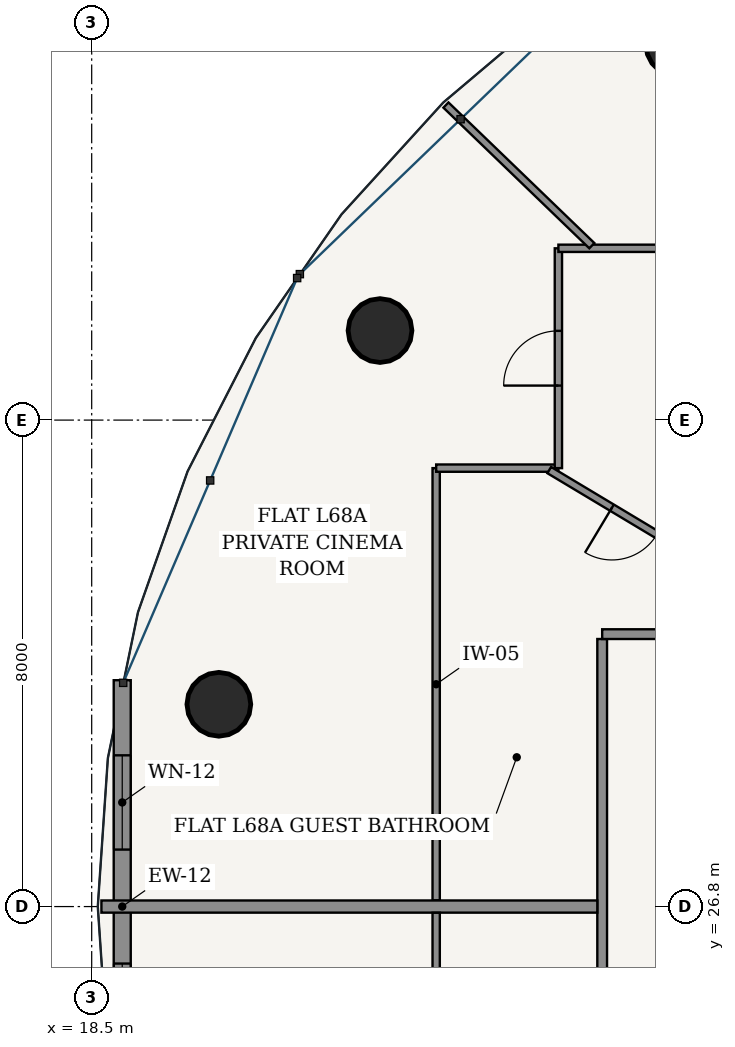
"""IFC4 building model, lengths in metres.
Left out: names, types, materials, properties, quantities, classifications, styles, units other than length and angle.
Written with IfcOpenShell. Run it as: python <this file> out.ifc"""

import sys

from ifc_helpers import new_model, si_unit, direction, frame, frame_2d, origin, origin_2d, place, context, subcontext, project, spatial, rectangle, hollow_circle, extrude, source, transform, mapped, element, fill, save


model = new_model("IFC4")
c1 = context("Model", 3, precision=1e-05, world=origin(), true_north=direction((-0.2419218956, 0.970295726276)))
c2 = subcontext(c1, "Body", "Model", "MODEL_VIEW")
j1 = project(units=[si_unit("LENGTHUNIT", "METRE"), si_unit("PLANEANGLEUNIT", "RADIAN")], contexts=[c1])
p1 = place(None, origin())
s1 = spatial("IfcSite", under=j1, at=p1, CompositionType="ELEMENT")
p2 = place(p1, origin())
s2 = spatial("IfcBuilding", under=s1, at=p2, CompositionType="ELEMENT")
p3 = place(p2, frame((0.0, 0.0, 259.45)))
s3 = spatial("IfcBuildingStorey", under=s2, at=p3, CompositionType="ELEMENT", Elevation=259.45)
for number, where, z_axis, x_axis in (
    (1, (28.139, 40.977, 0.0), (0.0, 0.0, 1.0), (1.0, 0.0, 0.0)),
    (2, (23.241, 36.272, 0.0), (0.0, 0.0, 1.0), (1.0, 0.0, 0.0)),
    (3, (20.591, 30.126, 0.0), (0.0, 0.0, 1.0), (1.0, 0.0, 0.0)),
):
    element("IfcColumn", number, at=place(p3, frame(where, z_axis=z_axis, x_axis=x_axis)), inside=s3, PredefinedType="COLUMN", context=c2, shape_type="SweptSolid", body=[
        extrude(hollow_circle(Radius=0.525, WallThickness=0.035, at=origin_2d()), origin(), (0.0, 0.0, 1.0), 3.75),
    ])
p4 = place(p3, frame((19.002, 30.522, 0.0), z_axis=(0.0, 0.0, 1.0), x_axis=(0.0, -1.0, 0.0)))
e4 = element("IfcWall", 4, at=p4, inside=s3, PredefinedType="SOLIDWALL", context=c2, shape_type="SweptSolid", body=[
    extrude(rectangle(XDim=7.445, YDim=0.28, at=frame_2d((3.722, 0.0))), origin(), (0.0, 0.0, 1.0), 3.49),
])
p5 = place(p4, frame((1.235, 0.0, 0.85)))
e5 = element("IfcOpeningElement", 5, at=p5, cuts=e4, PredefinedType="OPENING", context=c2, shape_type="SweptSolid", body=[
    extrude(rectangle(XDim=1.55, YDim=1.95, at=frame_2d((0.775, 0.975))), frame((0.0, 0.15, 0.0), z_axis=(0.0, -1.0, 0.0), x_axis=(1.0, 0.0, 0.0)), (0.0, 0.0, 1.0), 0.3),
])
p6 = place(p4, frame((4.66, 0.0, 0.85)))
e6 = element("IfcOpeningElement", 6, at=p6, cuts=e4, PredefinedType="OPENING", context=c2, shape_type="SweptSolid", body=[
    extrude(rectangle(XDim=1.55, YDim=1.95, at=frame_2d((0.775, 0.975))), frame((0.0, 0.15, 0.0), z_axis=(0.0, -1.0, 0.0), x_axis=(1.0, 0.0, 0.0)), (0.0, 0.0, 1.0), 0.3),
])
p7 = place(p3, frame((26.895, 17.275, 0.0), z_axis=(0.0, 0.0, 1.0), x_axis=(0.0, 1.0, 0.0)))
e7 = element("IfcWall", 7, at=p7, inside=s3, PredefinedType="PARTITIONING", context=c2, shape_type="SweptSolid", body=[
    extrude(rectangle(XDim=13.925, YDim=0.16, at=frame_2d((6.962, 0.0))), origin(), (0.0, 0.0, 1.0), 3.015),
])
p8 = place(p7, frame((1.992, 0.0, 0.0)))
e8 = element("IfcOpeningElement", 8, at=p8, cuts=e7, PredefinedType="OPENING", context=c2, shape_type="SweptSolid", body=[
    extrude(rectangle(XDim=0.98, YDim=2.2, at=frame_2d((0.49, 1.1))), frame((0.0, 0.09, 0.0), z_axis=(0.0, -1.0, 0.0), x_axis=(1.0, 0.0, 0.0)), (0.0, 0.0, 1.0), 0.18),
])
p9 = place(p3, frame((26.895, 31.28, 0.0), z_axis=(0.0, 0.0, 1.0), x_axis=(1.0, 0.0, 0.0)))
e9 = element("IfcWall", 9, at=p9, inside=s3, PredefinedType="PARTITIONING", context=c2, shape_type="SweptSolid", body=[
    extrude(rectangle(XDim=1.93, YDim=0.16, at=frame_2d((0.965, 0.0))), origin(), (0.0, 0.0, 1.0), 3.49),
])
p10 = place(p3, frame((24.165, 26.902, 0.0), z_axis=(0.0, 0.0, 1.0), x_axis=(0.0, 1.0, 0.0)))
e10 = element("IfcWall", 10, at=p10, inside=s3, PredefinedType="PARTITIONING", context=c2, shape_type="SweptSolid", body=[
    extrude(rectangle(XDim=7.108, YDim=0.12, at=frame_2d((3.554, 0.0))), origin(), (0.0, 0.0, 1.0), 3.015),
])
p11 = place(p3, frame((24.165, 34.01, 0.0), z_axis=(0.0, 0.0, 1.0), x_axis=(1.0, 0.0, 0.0)))
e11 = element("IfcWall", 11, at=p11, inside=s3, PredefinedType="PARTITIONING", context=c2, shape_type="SweptSolid", body=[
    extrude(rectangle(XDim=2.01, YDim=0.12, at=frame_2d((1.005, 0.0))), origin(), (0.0, 0.0, 1.0), 3.209),
])
p12 = place(p3, frame((26.175, 34.01, 0.0), z_axis=(0.0, 0.0, 1.0), x_axis=(0.0, 1.0, 0.0)))
e12 = element("IfcWall", 12, at=p12, inside=s3, PredefinedType="PARTITIONING", context=c2, shape_type="SweptSolid", body=[
    extrude(rectangle(XDim=3.615, YDim=0.12, at=frame_2d((1.808, 0.0))), origin(), (0.0, 0.0, 1.0), 3.015),
])
p13 = place(p12, frame((1.357, 0.0, 0.0)))
e13 = element("IfcOpeningElement", 13, at=p13, cuts=e12, PredefinedType="OPENING", context=c2, shape_type="SweptSolid", body=[
    extrude(rectangle(XDim=0.9, YDim=2.15, at=frame_2d((0.45, 1.075))), frame((0.0, 0.07, 0.0), z_axis=(0.0, -1.0, 0.0), x_axis=(1.0, 0.0, 0.0)), (0.0, 0.0, 1.0), 0.14),
])
p14 = place(p3, frame((26.175, 37.625, 0.0), z_axis=(0.0, 0.0, 1.0), x_axis=(1.0, 0.0, 0.0)))
e14 = element("IfcWall", 14, at=p14, inside=s3, PredefinedType="PARTITIONING", context=c2, shape_type="SweptSolid", body=[
    extrude(rectangle(XDim=23.65, YDim=0.12, at=frame_2d((11.825, 0.0))), origin(), (0.0, 0.0, 1.0), 3.015),
])
p15 = place(p14, frame((14.733, 0.0, 0.0)))
e15 = element("IfcOpeningElement", 15, at=p15, cuts=e14, PredefinedType="OPENING", context=c2, shape_type="SweptSolid", body=[
    extrude(rectangle(XDim=0.9, YDim=2.15, at=frame_2d((0.45, 1.075))), frame((0.0, 0.07, 0.0), z_axis=(0.0, -1.0, 0.0), x_axis=(1.0, 0.0, 0.0)), (0.0, 0.0, 1.0), 0.14),
])
p16 = place(p14, frame((11.279, 0.0, 0.0)))
e16 = element("IfcOpeningElement", 16, at=p16, cuts=e14, PredefinedType="OPENING", context=c2, shape_type="SweptSolid", body=[
    extrude(rectangle(XDim=0.9, YDim=2.15, at=frame_2d((0.45, 1.075))), frame((0.0, 0.07, 0.0), z_axis=(0.0, -1.0, 0.0), x_axis=(1.0, 0.0, 0.0)), (0.0, 0.0, 1.0), 0.14),
])
p17 = place(p14, frame((2.678, 0.0, 0.0)))
e17 = element("IfcOpeningElement", 17, at=p17, cuts=e14, PredefinedType="OPENING", context=c2, shape_type="SweptSolid", body=[
    extrude(rectangle(XDim=0.9, YDim=2.15, at=frame_2d((0.45, 1.075))), frame((0.0, 0.07, 0.0), z_axis=(0.0, -1.0, 0.0), x_axis=(1.0, 0.0, 0.0)), (0.0, 0.0, 1.0), 0.14),
])
p18 = place(p3, frame((26.725, 37.668, 0.0), z_axis=(0.0, 0.0, 1.0), x_axis=(-0.719954096891, 0.694021684366, 0.0)))
e18 = element("IfcWall", 18, at=p18, inside=s3, PredefinedType="PARTITIONING", context=c2, shape_type="SweptSolid", body=[
    extrude(rectangle(XDim=3.333, YDim=0.12, at=frame_2d((1.667, 0.0))), origin(), (0.0, 0.0, 1.0), 3.121),
])
p19 = place(p3, frame((28.825, 32.3, 0.0), z_axis=(0.0, 0.0, 1.0), x_axis=(-0.857743539935, 0.514077834282, 0.0)))
e19 = element("IfcWall", 19, at=p19, inside=s3, PredefinedType="PARTITIONING", context=c2, shape_type="SweptSolid", body=[
    extrude(rectangle(XDim=3.265, YDim=0.12, at=frame_2d((1.632, 0.0))), origin(), (0.0, 0.0, 1.0), 3.49),
])
p20 = place(p19, frame((1.202, 0.0, 0.0)))
e20 = element("IfcOpeningElement", 20, at=p20, cuts=e19, PredefinedType="OPENING", context=c2, shape_type="SweptSolid", body=[
    extrude(rectangle(XDim=0.86, YDim=2.15, at=frame_2d((0.43, 1.075))), frame((0.0, 0.07, 0.0), z_axis=(0.0, -1.0, 0.0), x_axis=(1.0, 0.0, 0.0)), (0.0, 0.0, 1.0), 0.14),
])
p21 = place(p3, frame((26.815, 26.8, 0.0), z_axis=(0.0, 0.0, 1.0), x_axis=(-1.0, 0.0, 0.0)))
e21 = element("IfcWall", 21, at=p21, inside=s3, PredefinedType="PARTITIONING", context=c2, shape_type="SweptSolid", body=[
    extrude(rectangle(XDim=8.155, YDim=0.2, at=frame_2d((4.078, 0.0))), origin(), (0.0, 0.0, 1.0), 3.121),
])
p22 = place(p3, frame((24.165, 14.465, 0.0), z_axis=(0.0, 0.0, 1.0), x_axis=(0.0, 1.0, 0.0)))
e22 = element("IfcWall", 22, at=p22, inside=s3, PredefinedType="PARTITIONING", context=c2, shape_type="SweptSolid", body=[
    extrude(rectangle(XDim=12.233, YDim=0.12, at=frame_2d((6.116, 0.0))), origin(), (0.0, 0.0, 1.0), 3.015),
])
p23 = place(p22, frame((3.863, 0.0, 0.0)))
e23 = element("IfcOpeningElement", 23, at=p23, cuts=e22, PredefinedType="OPENING", context=c2, shape_type="SweptSolid", body=[
    extrude(rectangle(XDim=0.9, YDim=2.15, at=frame_2d((0.45, 1.075))), frame((0.0, 0.07, 0.0), z_axis=(0.0, -1.0, 0.0), x_axis=(1.0, 0.0, 0.0)), (0.0, 0.0, 1.0), 0.14),
])
m1 = source(origin(), c2, "Body", "SweptSolid", [
    extrude(rectangle(XDim=1.55, YDim=1.95, at=frame_2d((0.775, 0.975))), frame((0.0, 0.03, 0.0), z_axis=(0.0, -1.0, 0.0), x_axis=(1.0, 0.0, 0.0)), (0.0, 0.0, 1.0), 0.06),
])
p24 = place(p5, origin())
e24 = element("IfcWindow", 24, at=p24, inside=s3, PartitioningType="SINGLE_PANEL", PredefinedType="WINDOW", context=c2, shape_type="MappedRepresentation", body=[
    mapped(m1, transform((0.0, 0.0, 0.0), scale=1.0)),
])
fill(e5, e24)
p25 = place(p6, origin())
e25 = element("IfcWindow", 25, at=p25, inside=s3, PartitioningType="SINGLE_PANEL", PredefinedType="WINDOW", context=c2, shape_type="MappedRepresentation", body=[
    mapped(m1, transform((0.0, 0.0, 0.0), scale=1.0)),
])
fill(e6, e25)
m2 = source(origin(), c2, "Body", "SweptSolid", [
    extrude(rectangle(XDim=0.86, YDim=2.15, at=frame_2d((0.43, 1.075))), frame((0.0, 0.025, 0.0), z_axis=(0.0, -1.0, 0.0), x_axis=(1.0, 0.0, 0.0)), (0.0, 0.0, 1.0), 0.05),
])
p26 = place(p20, origin())
e26 = element("IfcDoor", 26, at=p26, inside=s3, OperationType="SINGLE_SWING_RIGHT", PredefinedType="DOOR", context=c2, shape_type="MappedRepresentation", body=[
    mapped(m2, transform((0.0, 0.0, 0.0), scale=1.0)),
])
fill(e20, e26)
m3 = source(origin(), c2, "Body", "SweptSolid", [
    extrude(rectangle(XDim=0.9, YDim=2.15, at=frame_2d((0.45, 1.075))), frame((0.0, 0.025, 0.0), z_axis=(0.0, -1.0, 0.0), x_axis=(1.0, 0.0, 0.0)), (0.0, 0.0, 1.0), 0.05),
])
p27 = place(p13, origin())
e27 = element("IfcDoor", 27, at=p27, inside=s3, OperationType="SINGLE_SWING_LEFT", PredefinedType="DOOR", context=c2, shape_type="MappedRepresentation", body=[
    mapped(m3, transform((0.0, 0.0, 0.0), scale=1.0)),
])
fill(e13, e27)
save(model, sys.argv[1])
